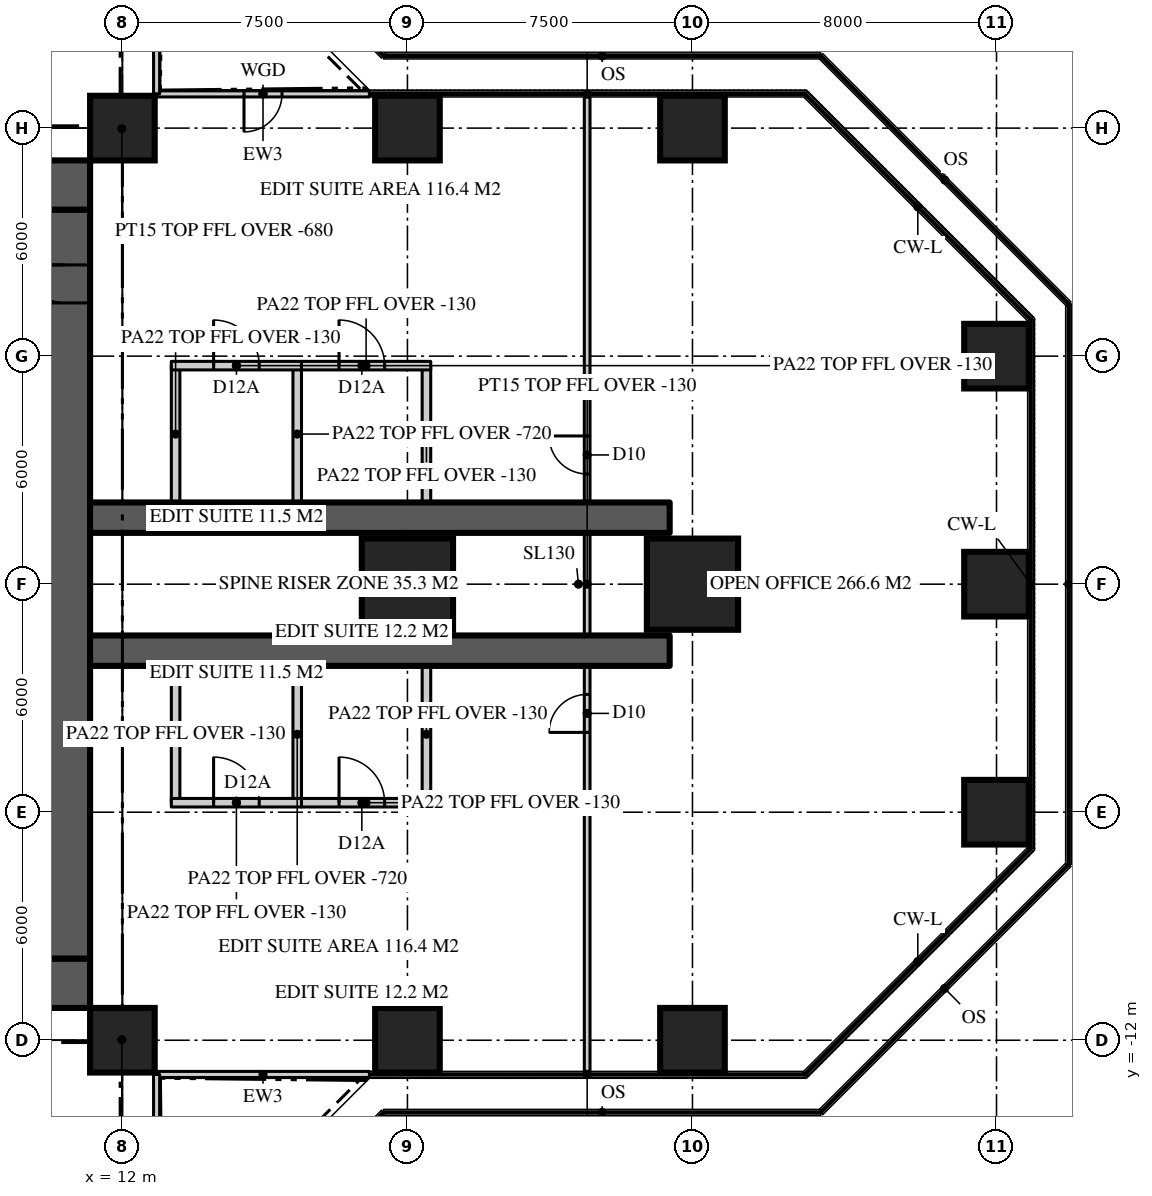
"""IFC4 building model, lengths in metres.
Left out: names, types, materials, properties, quantities, classifications, styles, units other than length and angle.
Written with IfcOpenShell. Run it as: python <this file> out.ifc"""

import sys

from ifc_helpers import new_model, si_unit, direction, frame, frame_2d, origin, origin_2d, place, context, subcontext, project, spatial, rectangle, extrude, element, fill, save


model = new_model("IFC4")
c1 = context("Model", 3, precision=1e-05, world=origin(), true_north=direction((0.0, 1.0)))
c2 = subcontext(c1, "Body", "Model", "MODEL_VIEW")
j1 = project(units=[si_unit("LENGTHUNIT", "METRE"), si_unit("PLANEANGLEUNIT", "RADIAN")], contexts=[c1])
p1 = place(None, origin())
s1 = spatial("IfcSite", under=j1, at=p1, CompositionType="ELEMENT")
p2 = place(p1, origin())
s2 = spatial("IfcBuilding", under=s1, at=p2, CompositionType="ELEMENT")
p3 = place(p2, frame((0.0, 0.0, 63.0)))
s3 = spatial("IfcBuildingStorey", under=s2, at=p3, CompositionType="ELEMENT", Elevation=63.0)
p4 = place(p3, frame((-11.15, 10.5, 0.0), z_axis=(0.0, 0.0, 1.0), x_axis=(1.0, 0.0, 0.0)))
e1 = element("IfcWall", 1, at=p4, inside=s3, PredefinedType="SHEAR", context=c2, shape_type="SweptSolid", body=[
    extrude(rectangle(XDim=22.3, YDim=1.3, at=frame_2d((11.15, 0.0))), origin(), (0.0, 0.0, 1.0), 3.9),
])
p5 = place(p4, frame((4.25, 0.0, 0.0)))
e2 = element("IfcOpeningElement", 2, at=p5, cuts=e1, PredefinedType="OPENING", context=c2, shape_type="SweptSolid", body=[
    extrude(rectangle(XDim=1.8, YDim=2.2, at=frame_2d((0.9, 1.1))), frame((0.0, 0.66, 0.0), z_axis=(0.0, -1.0, 0.0), x_axis=(1.0, 0.0, 0.0)), (0.0, 0.0, 1.0), 1.32),
])
p6 = place(p4, frame((16.25, 0.0, 0.0)))
e3 = element("IfcOpeningElement", 3, at=p6, cuts=e1, PredefinedType="OPENING", context=c2, shape_type="SweptSolid", body=[
    extrude(rectangle(XDim=1.8, YDim=2.2, at=frame_2d((0.9, 1.1))), frame((0.0, 0.66, 0.0), z_axis=(0.0, -1.0, 0.0), x_axis=(1.0, 0.0, 0.0)), (0.0, 0.0, 1.0), 1.32),
])
p7 = place(p3, frame((11.15, -10.5, 0.0), z_axis=(0.0, 0.0, 1.0), x_axis=(-1.0, 0.0, 0.0)))
e4 = element("IfcWall", 4, at=p7, inside=s3, PredefinedType="SHEAR", context=c2, shape_type="SweptSolid", body=[
    extrude(rectangle(XDim=22.3, YDim=1.3, at=frame_2d((11.15, 0.0))), origin(), (0.0, 0.0, 1.0), 3.9),
])
p8 = place(p7, frame((16.25, 0.0, 0.0)))
e5 = element("IfcOpeningElement", 5, at=p8, cuts=e4, PredefinedType="OPENING", context=c2, shape_type="SweptSolid", body=[
    extrude(rectangle(XDim=1.8, YDim=2.2, at=frame_2d((0.9, 1.1))), frame((0.0, 0.66, 0.0), z_axis=(0.0, -1.0, 0.0), x_axis=(1.0, 0.0, 0.0)), (0.0, 0.0, 1.0), 1.32),
])
p9 = place(p7, frame((4.25, 0.0, 0.0)))
e6 = element("IfcOpeningElement", 6, at=p9, cuts=e4, PredefinedType="OPENING", context=c2, shape_type="SweptSolid", body=[
    extrude(rectangle(XDim=1.8, YDim=2.2, at=frame_2d((0.9, 1.1))), frame((0.0, 0.66, 0.0), z_axis=(0.0, -1.0, 0.0), x_axis=(1.0, 0.0, 0.0)), (0.0, 0.0, 1.0), 1.32),
])
p10 = place(p3, frame((10.5, -9.85, 0.0), z_axis=(0.0, 0.0, 1.0), x_axis=(0.0, 1.0, 0.0)))
e7 = element("IfcWall", 7, at=p10, inside=s3, PredefinedType="SHEAR", context=c2, shape_type="SweptSolid", body=[
    extrude(rectangle(XDim=19.7, YDim=1.3, at=frame_2d((9.85, 0.0))), origin(), (0.0, 0.0, 1.0), 3.9),
])
p11 = place(p10, frame((17.25, 0.0, 0.0)))
e8 = element("IfcOpeningElement", 8, at=p11, cuts=e7, PredefinedType="OPENING", context=c2, shape_type="SweptSolid", body=[
    extrude(rectangle(XDim=1.0, YDim=2.2, at=frame_2d((0.5, 1.1))), frame((0.0, 0.66, 0.0), z_axis=(0.0, -1.0, 0.0), x_axis=(1.0, 0.0, 0.0)), (0.0, 0.0, 1.0), 1.32),
])
for number, where, z_axis, x_axis in (
    (9, (11.15, -1.75, 0.0), (0.0, 0.0, 1.0), (1.0, 0.0, 0.0)),
    (10, (11.15, 1.75, 0.0), (0.0, 0.0, 1.0), (1.0, 0.0, 0.0)),
):
    element("IfcWall", number, at=place(p3, frame(where, z_axis=z_axis, x_axis=x_axis)), inside=s3, PredefinedType="SHEAR", context=c2, shape_type="SweptSolid", body=[
        extrude(rectangle(XDim=15.25, YDim=0.8, at=frame_2d((7.625, 0.0))), origin(), (0.0, 0.0, 1.0), 3.9),
    ])
for number, where, z_axis, x_axis in (
    (11, (12.0, -12.0, 0.0), (0.0, 0.0, 1.0), (1.0, 0.0, 0.0)),
    (12, (19.5, -12.0, 0.0), (0.0, 0.0, 1.0), (1.0, 0.0, 0.0)),
    (13, (27.0, -12.0, 0.0), (0.0, 0.0, 1.0), (1.0, 0.0, 0.0)),
    (14, (35.0, -6.0, 0.0), (0.0, 0.0, 1.0), (1.0, 0.0, 0.0)),
):
    element("IfcColumn", number, at=place(p3, frame(where, z_axis=z_axis, x_axis=x_axis)), inside=s3, PredefinedType="COLUMN", context=c2, shape_type="SweptSolid", body=[
        extrude(rectangle(XDim=1.7, YDim=1.7, at=origin_2d()), origin(), (0.0, 0.0, 1.0), 3.9),
    ])
for number, where, z_axis, x_axis in (
    (15, (19.5, 0.0, 0.0), (0.0, 0.0, 1.0), (1.0, 0.0, 0.0)),
    (16, (27.0, 0.0, 0.0), (0.0, 0.0, 1.0), (1.0, 0.0, 0.0)),
):
    element("IfcColumn", number, at=place(p3, frame(where, z_axis=z_axis, x_axis=x_axis)), inside=s3, PredefinedType="COLUMN", context=c2, shape_type="SweptSolid", body=[
        extrude(rectangle(XDim=2.4, YDim=2.4, at=origin_2d()), origin(), (0.0, 0.0, 1.0), 3.9),
    ])
for number, where, z_axis, x_axis in (
    (17, (35.0, 0.0, 0.0), (0.0, 0.0, 1.0), (1.0, 0.0, 0.0)),
    (18, (35.0, 6.0, 0.0), (0.0, 0.0, 1.0), (1.0, 0.0, 0.0)),
    (19, (12.0, 12.0, 0.0), (0.0, 0.0, 1.0), (1.0, 0.0, 0.0)),
    (20, (19.5, 12.0, 0.0), (0.0, 0.0, 1.0), (1.0, 0.0, 0.0)),
    (21, (27.0, 12.0, 0.0), (0.0, 0.0, 1.0), (1.0, 0.0, 0.0)),
):
    element("IfcColumn", number, at=place(p3, frame(where, z_axis=z_axis, x_axis=x_axis)), inside=s3, PredefinedType="COLUMN", context=c2, shape_type="SweptSolid", body=[
        extrude(rectangle(XDim=1.7, YDim=1.7, at=origin_2d()), origin(), (0.0, 0.0, 1.0), 3.9),
    ])
p12 = place(p3, frame((12.9, -12.9, 0.0), z_axis=(0.0, 0.0, 1.0), x_axis=(1.0, 0.0, 0.0)))
e22 = element("IfcWall", 22, at=p12, inside=s3, PredefinedType="SOLIDWALL", context=c2, shape_type="SweptSolid", body=[
    extrude(rectangle(XDim=5.6, YDim=0.16, at=frame_2d((2.8, 0.0))), origin(), (0.0, 0.0, 1.0), 3.77),
])
p13 = place(p3, frame((18.5, 12.9, 0.0), z_axis=(0.0, 0.0, 1.0), x_axis=(-1.0, 0.0, 0.0)))
e23 = element("IfcWall", 23, at=p13, inside=s3, PredefinedType="SOLIDWALL", context=c2, shape_type="SweptSolid", body=[
    extrude(rectangle(XDim=5.6, YDim=0.16, at=frame_2d((2.8, 0.0))), origin(), (0.0, 0.0, 1.0), 3.77),
])
p14 = place(p13, frame((2.3, 0.0, 0.0)))
e24 = element("IfcOpeningElement", 24, at=p14, cuts=e23, PredefinedType="OPENING", context=c2, shape_type="SweptSolid", body=[
    extrude(rectangle(XDim=1.0, YDim=2.2, at=frame_2d((0.5, 1.1))), frame((0.0, 0.09, 0.0), z_axis=(0.0, -1.0, 0.0), x_axis=(1.0, 0.0, 0.0)), (0.0, 0.0, 1.0), 0.18),
])
p15 = place(p3, frame((12.9, 12.9, 0.0), z_axis=(0.0, 0.0, 1.0), x_axis=(0.0, 1.0, 0.0)))
e25 = element("IfcWall", 25, at=p15, inside=s3, PredefinedType="SOLIDWALL", context=c2, shape_type="SweptSolid", body=[
    extrude(rectangle(XDim=5.6, YDim=0.16, at=frame_2d((2.8, 0.0))), origin(), (0.0, 0.0, 1.0), 3.77),
])
p16 = place(p3, frame((12.9, -18.5, 0.0), z_axis=(0.0, 0.0, 1.0), x_axis=(0.0, 1.0, 0.0)))
e26 = element("IfcWall", 26, at=p16, inside=s3, PredefinedType="SOLIDWALL", context=c2, shape_type="SweptSolid", body=[
    extrude(rectangle(XDim=5.6, YDim=0.16, at=frame_2d((2.8, 0.0))), origin(), (0.0, 0.0, 1.0), 3.77),
])
p17 = place(p16, frame((2.3, 0.0, 0.0)))
e27 = element("IfcOpeningElement", 27, at=p17, cuts=e26, PredefinedType="OPENING", context=c2, shape_type="SweptSolid", body=[
    extrude(rectangle(XDim=1.0, YDim=2.2, at=frame_2d((0.5, 1.1))), frame((0.0, 0.09, 0.0), z_axis=(0.0, -1.0, 0.0), x_axis=(1.0, 0.0, 0.0)), (0.0, 0.0, 1.0), 0.18),
])
p18 = place(p3, frame((24.229, -12.82, 0.0), z_axis=(0.0, 0.0, 1.0), x_axis=(0.0, 1.0, 0.0)))
e28 = element("IfcWall", 28, at=p18, inside=s3, PredefinedType="PARTITIONING", context=c2, shape_type="SweptSolid", body=[
    extrude(rectangle(XDim=25.64, YDim=0.15, at=frame_2d((12.82, 0.0))), origin(), (0.0, 0.0, 1.0), 3.77),
])
p19 = place(p18, frame((15.72, 0.0, 0.0)))
e29 = element("IfcOpeningElement", 29, at=p19, cuts=e28, PredefinedType="OPENING", context=c2, shape_type="SweptSolid", body=[
    extrude(rectangle(XDim=1.0, YDim=2.2, at=frame_2d((0.5, 1.1))), frame((0.0, 0.085, 0.0), z_axis=(0.0, -1.0, 0.0), x_axis=(1.0, 0.0, 0.0)), (0.0, 0.0, 1.0), 0.17),
])
p20 = place(p18, frame((8.92, 0.0, 0.0)))
e30 = element("IfcOpeningElement", 30, at=p20, cuts=e28, PredefinedType="OPENING", context=c2, shape_type="SweptSolid", body=[
    extrude(rectangle(XDim=1.0, YDim=2.2, at=frame_2d((0.5, 1.1))), frame((0.0, 0.085, 0.0), z_axis=(0.0, -1.0, 0.0), x_axis=(1.0, 0.0, 0.0)), (0.0, 0.0, 1.0), 0.17),
])
p21 = place(p3, frame((13.4, 2.15, 0.0), z_axis=(0.0, 0.0, 1.0), x_axis=(0.0, 1.0, 0.0)))
e31 = element("IfcWall", 31, at=p21, inside=s3, PredefinedType="PARTITIONING", context=c2, shape_type="SweptSolid", body=[
    extrude(rectangle(XDim=3.6, YDim=0.225, at=frame_2d((1.8, 0.0))), origin(), (0.0, 0.0, 1.0), 3.77),
])
p22 = place(p3, frame((16.6, 2.15, 0.0), z_axis=(0.0, 0.0, 1.0), x_axis=(0.0, 1.0, 0.0)))
e32 = element("IfcWall", 32, at=p22, inside=s3, PredefinedType="PARTITIONING", context=c2, shape_type="SweptSolid", body=[
    extrude(rectangle(XDim=3.6, YDim=0.225, at=frame_2d((1.8, 0.0))), origin(), (0.0, 0.0, 1.0), 3.18),
])
p23 = place(p3, frame((13.288, 5.75, 0.0), z_axis=(0.0, 0.0, 1.0), x_axis=(1.0, 0.0, 0.0)))
e33 = element("IfcWall", 33, at=p23, inside=s3, PredefinedType="PARTITIONING", context=c2, shape_type="SweptSolid", body=[
    extrude(rectangle(XDim=3.425, YDim=0.225, at=frame_2d((1.712, 0.0))), origin(), (0.0, 0.0, 1.0), 3.77),
])
p24 = place(p23, frame((1.113, 0.0, 0.0)))
e34 = element("IfcOpeningElement", 34, at=p24, cuts=e33, PredefinedType="OPENING", context=c2, shape_type="SweptSolid", body=[
    extrude(rectangle(XDim=1.2, YDim=2.2, at=frame_2d((0.6, 1.1))), frame((0.0, 0.123, 0.0), z_axis=(0.0, -1.0, 0.0), x_axis=(1.0, 0.0, 0.0)), (0.0, 0.0, 1.0), 0.245),
])
p25 = place(p3, frame((20.0, 2.15, 0.0), z_axis=(0.0, 0.0, 1.0), x_axis=(0.0, 1.0, 0.0)))
e35 = element("IfcWall", 35, at=p25, inside=s3, PredefinedType="PARTITIONING", context=c2, shape_type="SweptSolid", body=[
    extrude(rectangle(XDim=3.6, YDim=0.225, at=frame_2d((1.8, 0.0))), origin(), (0.0, 0.0, 1.0), 3.77),
])
p26 = place(p3, frame((16.712, 5.75, 0.0), z_axis=(0.0, 0.0, 1.0), x_axis=(1.0, 0.0, 0.0)))
e36 = element("IfcWall", 36, at=p26, inside=s3, PredefinedType="PARTITIONING", context=c2, shape_type="SweptSolid", body=[
    extrude(rectangle(XDim=3.4, YDim=0.225, at=frame_2d((1.7, 0.0))), origin(), (0.0, 0.0, 1.0), 3.77),
])
p27 = place(p26, frame((0.988, 0.0, 0.0)))
e37 = element("IfcOpeningElement", 37, at=p27, cuts=e36, PredefinedType="OPENING", context=c2, shape_type="SweptSolid", body=[
    extrude(rectangle(XDim=1.2, YDim=2.2, at=frame_2d((0.6, 1.1))), frame((0.0, 0.123, 0.0), z_axis=(0.0, -1.0, 0.0), x_axis=(1.0, 0.0, 0.0)), (0.0, 0.0, 1.0), 0.245),
])
p28 = place(p3, frame((13.4, -2.15, 0.0), z_axis=(0.0, 0.0, 1.0), x_axis=(0.0, -1.0, 0.0)))
e38 = element("IfcWall", 38, at=p28, inside=s3, PredefinedType="PARTITIONING", context=c2, shape_type="SweptSolid", body=[
    extrude(rectangle(XDim=3.6, YDim=0.225, at=frame_2d((1.8, 0.0))), origin(), (0.0, 0.0, 1.0), 3.77),
])
p29 = place(p3, frame((16.6, -2.15, 0.0), z_axis=(0.0, 0.0, 1.0), x_axis=(0.0, -1.0, 0.0)))
e39 = element("IfcWall", 39, at=p29, inside=s3, PredefinedType="PARTITIONING", context=c2, shape_type="SweptSolid", body=[
    extrude(rectangle(XDim=3.6, YDim=0.225, at=frame_2d((1.8, 0.0))), origin(), (0.0, 0.0, 1.0), 3.18),
])
p30 = place(p3, frame((13.288, -5.75, 0.0), z_axis=(0.0, 0.0, 1.0), x_axis=(1.0, 0.0, 0.0)))
e40 = element("IfcWall", 40, at=p30, inside=s3, PredefinedType="PARTITIONING", context=c2, shape_type="SweptSolid", body=[
    extrude(rectangle(XDim=3.425, YDim=0.225, at=frame_2d((1.712, 0.0))), origin(), (0.0, 0.0, 1.0), 3.77),
])
p31 = place(p30, frame((1.113, 0.0, 0.0)))
e41 = element("IfcOpeningElement", 41, at=p31, cuts=e40, PredefinedType="OPENING", context=c2, shape_type="SweptSolid", body=[
    extrude(rectangle(XDim=1.2, YDim=2.2, at=frame_2d((0.6, 1.1))), frame((0.0, 0.123, 0.0), z_axis=(0.0, -1.0, 0.0), x_axis=(1.0, 0.0, 0.0)), (0.0, 0.0, 1.0), 0.245),
])
p32 = place(p3, frame((20.0, -2.15, 0.0), z_axis=(0.0, 0.0, 1.0), x_axis=(0.0, -1.0, 0.0)))
e42 = element("IfcWall", 42, at=p32, inside=s3, PredefinedType="PARTITIONING", context=c2, shape_type="SweptSolid", body=[
    extrude(rectangle(XDim=3.6, YDim=0.225, at=frame_2d((1.8, 0.0))), origin(), (0.0, 0.0, 1.0), 3.77),
])
p33 = place(p3, frame((16.712, -5.75, 0.0), z_axis=(0.0, 0.0, 1.0), x_axis=(1.0, 0.0, 0.0)))
e43 = element("IfcWall", 43, at=p33, inside=s3, PredefinedType="PARTITIONING", context=c2, shape_type="SweptSolid", body=[
    extrude(rectangle(XDim=3.4, YDim=0.225, at=frame_2d((1.7, 0.0))), origin(), (0.0, 0.0, 1.0), 3.77),
])
p34 = place(p33, frame((0.988, 0.0, 0.0)))
e44 = element("IfcOpeningElement", 44, at=p34, cuts=e43, PredefinedType="OPENING", context=c2, shape_type="SweptSolid", body=[
    extrude(rectangle(XDim=1.2, YDim=2.2, at=frame_2d((0.6, 1.1))), frame((0.0, 0.123, 0.0), z_axis=(0.0, -1.0, 0.0), x_axis=(1.0, 0.0, 0.0)), (0.0, 0.0, 1.0), 0.245),
])
for number, where, z_axis, x_axis in (
    (45, (11.15, 11.15, 0.0), (0.0, 0.0, 1.0), (0.707, 0.707, 0.0)),
    (46, (11.15, -11.15, 0.0), (0.0, 0.0, 1.0), (0.707, -0.707, 0.0)),
):
    element("IfcWall", number, at=place(p3, frame(where, z_axis=z_axis, x_axis=x_axis)), inside=s3, PredefinedType="PARTITIONING", context=c2, shape_type="SweptSolid", body=[
        extrude(rectangle(XDim=2.362, YDim=0.15, at=frame_2d((1.181, 0.0))), origin(), (0.0, 0.0, 1.0), 3.22),
    ])
p35 = place(p14, origin())
e47 = element("IfcDoor", 47, at=p35, inside=s3, OperationType="SINGLE_SWING_RIGHT", PredefinedType="DOOR", context=c2, shape_type="SweptSolid", body=[
    extrude(rectangle(XDim=1.0, YDim=2.2, at=frame_2d((0.5, 1.1))), frame((0.0, 0.025, 0.0), z_axis=(0.0, -1.0, 0.0), x_axis=(1.0, 0.0, 0.0)), (0.0, 0.0, 1.0), 0.05),
])
fill(e24, e47)
p36 = place(p11, origin())
e48 = element("IfcDoor", 48, at=p36, inside=s3, OperationType="SINGLE_SWING_RIGHT", PredefinedType="DOOR", context=c2, shape_type="SweptSolid", body=[
    extrude(rectangle(XDim=1.0, YDim=2.2, at=frame_2d((0.5, 1.1))), frame((0.0, 0.025, 0.0), z_axis=(0.0, -1.0, 0.0), x_axis=(1.0, 0.0, 0.0)), (0.0, 0.0, 1.0), 0.05),
])
fill(e8, e48)
p37 = place(p19, origin())
e49 = element("IfcDoor", 49, at=p37, inside=s3, OperationType="SINGLE_SWING_RIGHT", PredefinedType="DOOR", context=c2, shape_type="SweptSolid", body=[
    extrude(rectangle(XDim=1.0, YDim=2.2, at=frame_2d((0.5, 1.1))), frame((0.0, 0.025, 0.0), z_axis=(0.0, -1.0, 0.0), x_axis=(1.0, 0.0, 0.0)), (0.0, 0.0, 1.0), 0.05),
])
fill(e29, e49)
p38 = place(p20, origin())
e50 = element("IfcDoor", 50, at=p38, inside=s3, OperationType="SINGLE_SWING_LEFT", PredefinedType="DOOR", context=c2, shape_type="SweptSolid", body=[
    extrude(rectangle(XDim=1.0, YDim=2.2, at=frame_2d((0.5, 1.1))), frame((0.0, 0.025, 0.0), z_axis=(0.0, -1.0, 0.0), x_axis=(1.0, 0.0, 0.0)), (0.0, 0.0, 1.0), 0.05),
])
fill(e30, e50)
p39 = place(p24, origin())
e51 = element("IfcDoor", 51, at=p39, inside=s3, OperationType="SINGLE_SWING_LEFT", PredefinedType="DOOR", context=c2, shape_type="SweptSolid", body=[
    extrude(rectangle(XDim=1.2, YDim=2.2, at=frame_2d((0.6, 1.1))), frame((0.0, 0.025, 0.0), z_axis=(0.0, -1.0, 0.0), x_axis=(1.0, 0.0, 0.0)), (0.0, 0.0, 1.0), 0.05),
])
fill(e34, e51)
p40 = place(p27, origin())
e52 = element("IfcDoor", 52, at=p40, inside=s3, OperationType="SINGLE_SWING_LEFT", PredefinedType="DOOR", context=c2, shape_type="SweptSolid", body=[
    extrude(rectangle(XDim=1.2, YDim=2.2, at=frame_2d((0.6, 1.1))), frame((0.0, 0.025, 0.0), z_axis=(0.0, -1.0, 0.0), x_axis=(1.0, 0.0, 0.0)), (0.0, 0.0, 1.0), 0.05),
])
fill(e37, e52)
p41 = place(p31, origin())
e53 = element("IfcDoor", 53, at=p41, inside=s3, OperationType="SINGLE_SWING_LEFT", PredefinedType="DOOR", context=c2, shape_type="SweptSolid", body=[
    extrude(rectangle(XDim=1.2, YDim=2.2, at=frame_2d((0.6, 1.1))), frame((0.0, 0.025, 0.0), z_axis=(0.0, -1.0, 0.0), x_axis=(1.0, 0.0, 0.0)), (0.0, 0.0, 1.0), 0.05),
])
fill(e41, e53)
p42 = place(p34, origin())
e54 = element("IfcDoor", 54, at=p42, inside=s3, OperationType="SINGLE_SWING_LEFT", PredefinedType="DOOR", context=c2, shape_type="SweptSolid", body=[
    extrude(rectangle(XDim=1.2, YDim=2.2, at=frame_2d((0.6, 1.1))), frame((0.0, 0.025, 0.0), z_axis=(0.0, -1.0, 0.0), x_axis=(1.0, 0.0, 0.0)), (0.0, 0.0, 1.0), 0.05),
])
fill(e44, e54)
save(model, sys.argv[1])
